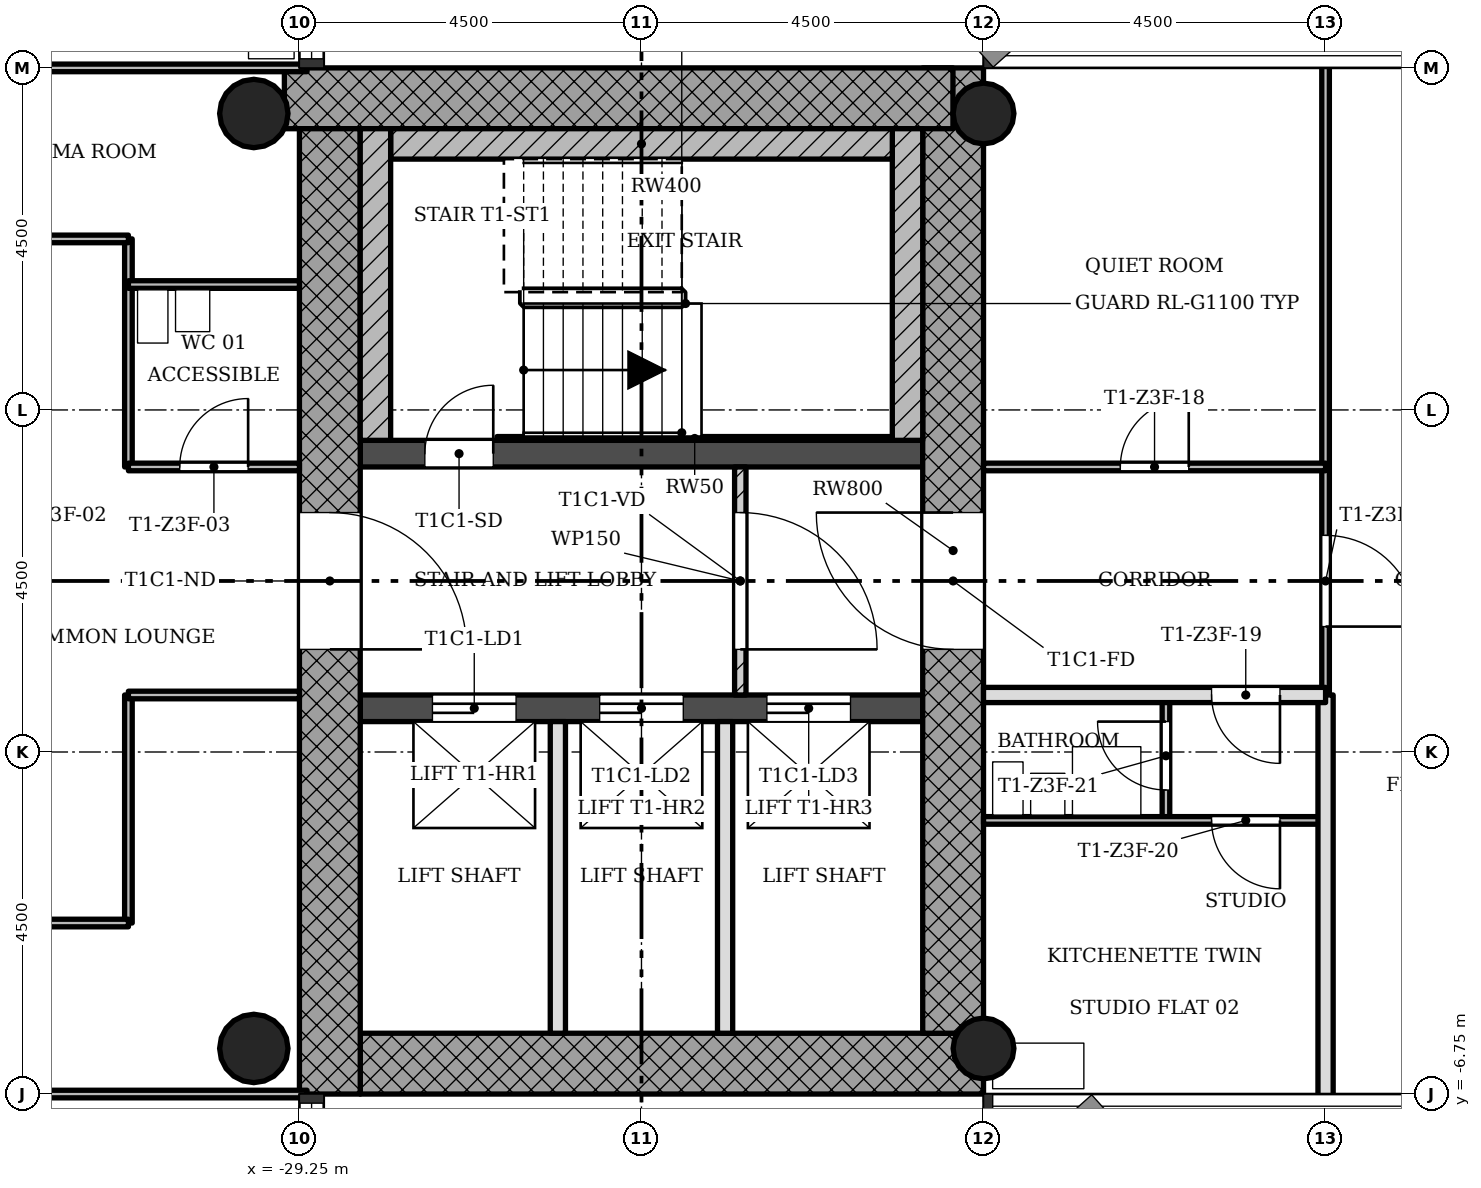
"""IFC4 building model, lengths in metres.
Left out: names, types, materials, properties, quantities, classifications, styles, units other than length and angle.
Written with IfcOpenShell. Run it as: python <this file> out.ifc"""

import sys

from ifc_helpers import new_model, si_unit, direction, frame, frame_2d, origin, origin_2d, place, context, subcontext, project, spatial, rectangle, hollow_circle, extrude, element, fill, save


model = new_model("IFC4")
c1 = context("Model", 3, precision=1e-05, world=origin(), true_north=direction((0.0, 1.0)))
c2 = subcontext(c1, "Body", "Model", "MODEL_VIEW")
j1 = project(units=[si_unit("LENGTHUNIT", "METRE"), si_unit("PLANEANGLEUNIT", "RADIAN")], contexts=[c1])
p1 = place(None, origin())
s1 = spatial("IfcSite", under=j1, at=p1, CompositionType="ELEMENT")
p2 = place(p1, origin())
s2 = spatial("IfcBuilding", under=s1, at=p2, CompositionType="ELEMENT")
p3 = place(p2, frame((0.0, 0.0, 164.3)))
s3 = spatial("IfcBuildingStorey", under=s2, at=p3, CompositionType="ELEMENT", Elevation=164.3)
p4 = place(p3, frame((-28.45, -6.35, 0.0), z_axis=(0.0, 0.0, 1.0), x_axis=(1.0, 0.0, 0.0)))
e1 = element("IfcWall", 1, at=p4, inside=s3, PredefinedType="SHEAR", context=c2, shape_type="SweptSolid", body=[
    extrude(rectangle(XDim=8.2, YDim=0.8, at=frame_2d((4.1, 0.0))), origin(), (0.0, 0.0, 1.0), 3.4),
])
p5 = place(p3, frame((-20.65, -5.95, 0.0), z_axis=(0.0, 0.0, 1.0), x_axis=(0.0, 1.0, 0.0)))
e2 = element("IfcWall", 2, at=p5, inside=s3, PredefinedType="SHEAR", context=c2, shape_type="SweptSolid", body=[
    extrude(rectangle(XDim=12.7, YDim=0.8, at=frame_2d((6.35, 0.0))), origin(), (0.0, 0.0, 1.0), 3.4),
])
p6 = place(p5, frame((5.05, 0.0, 0.0)))
e3 = element("IfcOpeningElement", 3, at=p6, cuts=e2, PredefinedType="OPENING", context=c2, shape_type="SweptSolid", body=[
    extrude(rectangle(XDim=1.8, YDim=2.1, at=frame_2d((0.9, 1.05))), frame((0.0, 0.41, 0.0), z_axis=(0.0, -1.0, 0.0), x_axis=(1.0, 0.0, 0.0)), (0.0, 0.0, 1.0), 0.82),
])
p7 = place(p3, frame((-20.652, 6.35, 0.0), z_axis=(0.0, 0.0, 1.0), x_axis=(-1.0, 0.0, 0.0)))
e4 = element("IfcWall", 4, at=p7, inside=s3, PredefinedType="SHEAR", context=c2, shape_type="SweptSolid", body=[
    extrude(rectangle(XDim=8.796, YDim=0.8, at=frame_2d((4.398, 0.0))), origin(), (0.0, 0.0, 1.0), 3.4),
])
p8 = place(p3, frame((-28.85, 5.95, 0.0), z_axis=(0.0, 0.0, 1.0), x_axis=(0.0, -1.0, 0.0)))
e5 = element("IfcWall", 5, at=p8, inside=s3, PredefinedType="SHEAR", context=c2, shape_type="SweptSolid", body=[
    extrude(rectangle(XDim=12.7, YDim=0.8, at=frame_2d((6.35, 0.0))), origin(), (0.0, 0.0, 1.0), 3.4),
])
p9 = place(p8, frame((5.05, 0.0, 0.0)))
e6 = element("IfcOpeningElement", 6, at=p9, cuts=e5, PredefinedType="OPENING", context=c2, shape_type="SweptSolid", body=[
    extrude(rectangle(XDim=1.8, YDim=2.1, at=frame_2d((0.9, 1.05))), frame((0.0, 0.41, 0.0), z_axis=(0.0, -1.0, 0.0), x_axis=(1.0, 0.0, 0.0)), (0.0, 0.0, 1.0), 0.82),
])
p10 = place(p3, frame((-28.45, -1.675, 0.0), z_axis=(0.0, 0.0, 1.0), x_axis=(1.0, 0.0, 0.0)))
e7 = element("IfcWall", 7, at=p10, inside=s3, PredefinedType="SHEAR", context=c2, shape_type="SweptSolid", body=[
    extrude(rectangle(XDim=7.4, YDim=0.35, at=frame_2d((3.7, 0.0))), origin(), (0.0, 0.0, 1.0), 3.4),
])
p11 = place(p10, frame((0.95, 0.0, 0.0)))
e8 = element("IfcOpeningElement", 8, at=p11, cuts=e7, PredefinedType="OPENING", context=c2, shape_type="SweptSolid", body=[
    extrude(rectangle(XDim=1.1, YDim=2.1, at=frame_2d((0.55, 1.05))), frame((0.0, 0.185, 0.0), z_axis=(0.0, -1.0, 0.0), x_axis=(1.0, 0.0, 0.0)), (0.0, 0.0, 1.0), 0.37),
])
p12 = place(p10, frame((3.15, 0.0, 0.0)))
e9 = element("IfcOpeningElement", 9, at=p12, cuts=e7, PredefinedType="OPENING", context=c2, shape_type="SweptSolid", body=[
    extrude(rectangle(XDim=1.1, YDim=2.1, at=frame_2d((0.55, 1.05))), frame((0.0, 0.185, 0.0), z_axis=(0.0, -1.0, 0.0), x_axis=(1.0, 0.0, 0.0)), (0.0, 0.0, 1.0), 0.37),
])
p13 = place(p10, frame((5.35, 0.0, 0.0)))
e10 = element("IfcOpeningElement", 10, at=p13, cuts=e7, PredefinedType="OPENING", context=c2, shape_type="SweptSolid", body=[
    extrude(rectangle(XDim=1.1, YDim=2.1, at=frame_2d((0.55, 1.05))), frame((0.0, 0.185, 0.0), z_axis=(0.0, -1.0, 0.0), x_axis=(1.0, 0.0, 0.0)), (0.0, 0.0, 1.0), 0.37),
])
p14 = place(p3, frame((-28.45, 1.675, 0.0), z_axis=(0.0, 0.0, 1.0), x_axis=(1.0, 0.0, 0.0)))
e11 = element("IfcWall", 11, at=p14, inside=s3, PredefinedType="SHEAR", context=c2, shape_type="SweptSolid", body=[
    extrude(rectangle(XDim=7.4, YDim=0.35, at=frame_2d((3.7, 0.0))), origin(), (0.0, 0.0, 1.0), 3.4),
])
p15 = place(p14, frame((0.85, 0.0, 0.0)))
e12 = element("IfcOpeningElement", 12, at=p15, cuts=e11, PredefinedType="OPENING", context=c2, shape_type="SweptSolid", body=[
    extrude(rectangle(XDim=0.9, YDim=2.1, at=frame_2d((0.45, 1.05))), frame((0.0, 0.185, 0.0), z_axis=(0.0, -1.0, 0.0), x_axis=(1.0, 0.0, 0.0)), (0.0, 0.0, 1.0), 0.37),
])
for number, where, z_axis, x_axis in (
    (13, (-20.25, -6.15, 0.0), (0.0, 0.0, 1.0), (1.0, 0.0, 0.0)),
    (14, (-20.25, 6.15, 0.0), (0.0, 0.0, 1.0), (1.0, 0.0, 0.0)),
):
    element("IfcColumn", number, at=place(p3, frame(where, z_axis=z_axis, x_axis=x_axis)), inside=s3, PredefinedType="COLUMN", context=c2, shape_type="SweptSolid", body=[
        extrude(hollow_circle(Radius=0.4, WallThickness=0.028, at=origin_2d()), origin(), (0.0, 0.0, 1.0), 3.4),
    ])
for number, where, z_axis, x_axis in (
    (15, (-29.85, -6.15, 0.0), (0.0, 0.0, 1.0), (1.0, 0.0, 0.0)),
    (16, (-29.85, 6.15, 0.0), (0.0, 0.0, 1.0), (1.0, 0.0, 0.0)),
):
    element("IfcColumn", number, at=place(p3, frame(where, z_axis=z_axis, x_axis=x_axis)), inside=s3, PredefinedType="COLUMN", context=c2, shape_type="SweptSolid", body=[
        extrude(hollow_circle(Radius=0.45, WallThickness=0.032, at=origin_2d()), origin(), (0.0, 0.0, 1.0), 3.4),
    ])
p16 = place(p3, frame((-23.45, -1.5, 0.0), z_axis=(0.0, 0.0, 1.0), x_axis=(0.0, 1.0, 0.0)))
e17 = element("IfcWall", 17, at=p16, inside=s3, PredefinedType="PARTITIONING", context=c2, shape_type="SweptSolid", body=[
    extrude(rectangle(XDim=3.0, YDim=0.15, at=frame_2d((1.5, 0.0))), origin(), (0.0, 0.0, 1.0), 3.0),
])
p17 = place(p16, frame((0.6, 0.0, 0.0)))
e18 = element("IfcOpeningElement", 18, at=p17, cuts=e17, PredefinedType="OPENING", context=c2, shape_type="SweptSolid", body=[
    extrude(rectangle(XDim=1.8, YDim=2.1, at=frame_2d((0.9, 1.05))), frame((0.0, 0.085, 0.0), z_axis=(0.0, -1.0, 0.0), x_axis=(1.0, 0.0, 0.0)), (0.0, 0.0, 1.0), 0.17),
])
for number, where, z_axis, x_axis in (
    (19, (-25.85, -5.95, 0.0), (0.0, 0.0, 1.0), (0.0, 1.0, 0.0)),
    (20, (-23.65, -5.95, 0.0), (0.0, 0.0, 1.0), (0.0, 1.0, 0.0)),
):
    element("IfcWall", number, at=place(p3, frame(where, z_axis=z_axis, x_axis=x_axis)), inside=s3, PredefinedType="SOLIDWALL", context=c2, shape_type="SweptSolid", body=[
        extrude(rectangle(XDim=4.1, YDim=0.2, at=frame_2d((2.05, 0.0))), origin(), (0.0, 0.0, 1.0), 3.0),
    ])
for number, where, z_axis, x_axis in (
    (21, (-31.5, -4.5, 0.0), (0.0, 0.0, 1.0), (0.0, 1.0, 0.0)),
    (22, (-31.5, 1.5, 0.0), (0.0, 0.0, 1.0), (0.0, 1.0, 0.0)),
):
    element("IfcWall", number, at=place(p3, frame(where, z_axis=z_axis, x_axis=x_axis)), inside=s3, PredefinedType="PARTITIONING", context=c2, shape_type="SweptSolid", body=[
        extrude(rectangle(XDim=3.0, YDim=0.1, at=frame_2d((1.5, 0.0))), origin(), (0.0, 0.0, 1.0), 3.0),
    ])
p18 = place(p3, frame((-17.85, -3.15, 0.0), z_axis=(0.0, 0.0, 1.0), x_axis=(0.0, 1.0, 0.0)))
e23 = element("IfcWall", 23, at=p18, inside=s3, PredefinedType="PARTITIONING", context=c2, shape_type="SweptSolid", body=[
    extrude(rectangle(XDim=1.65, YDim=0.1, at=frame_2d((0.825, 0.0))), origin(), (0.0, 0.0, 1.0), 3.0),
])
p19 = place(p18, frame((0.4, 0.0, 0.0)))
e24 = element("IfcOpeningElement", 24, at=p19, cuts=e23, PredefinedType="OPENING", context=c2, shape_type="SweptSolid", body=[
    extrude(rectangle(XDim=0.9, YDim=2.1, at=frame_2d((0.45, 1.05))), frame((0.0, 0.06, 0.0), z_axis=(0.0, -1.0, 0.0), x_axis=(1.0, 0.0, 0.0)), (0.0, 0.0, 1.0), 0.12),
])
p20 = place(p3, frame((-15.75, -1.5, 0.0), z_axis=(0.0, 0.0, 1.0), x_axis=(0.0, 1.0, 0.0)))
e25 = element("IfcWall", 25, at=p20, inside=s3, PredefinedType="PARTITIONING", context=c2, shape_type="SweptSolid", body=[
    extrude(rectangle(XDim=8.35, YDim=0.1, at=frame_2d((4.175, 0.0))), origin(), (0.0, 0.0, 1.0), 3.0),
])
p21 = place(p20, frame((0.9, 0.0, 0.0)))
e26 = element("IfcOpeningElement", 26, at=p21, cuts=e25, PredefinedType="OPENING", context=c2, shape_type="SweptSolid", body=[
    extrude(rectangle(XDim=1.2, YDim=2.1, at=frame_2d((0.6, 1.05))), frame((0.0, 0.06, 0.0), z_axis=(0.0, -1.0, 0.0), x_axis=(1.0, 0.0, 0.0)), (0.0, 0.0, 1.0), 0.12),
])
p22 = place(p3, frame((-15.75, -6.85, 0.0), z_axis=(0.0, 0.0, 1.0), x_axis=(0.0, 1.0, 0.0)))
e27 = element("IfcWall", 27, at=p22, inside=s3, PredefinedType="SOLIDWALL", context=c2, shape_type="SweptSolid", body=[
    extrude(rectangle(XDim=5.35, YDim=0.2, at=frame_2d((2.675, 0.0))), origin(), (0.0, 0.0, 1.0), 3.0),
])
p23 = place(p3, frame((-35.1, -6.75, 0.0), z_axis=(0.0, 0.0, 1.0), x_axis=(1.0, 0.0, 0.0)))
e28 = element("IfcWall", 28, at=p23, inside=s3, PredefinedType="PARTITIONING", context=c2, shape_type="SweptSolid", body=[
    extrude(rectangle(XDim=5.95, YDim=0.1, at=frame_2d((2.975, 0.0))), origin(), (0.0, 0.0, 1.0), 3.0),
])
p24 = place(p3, frame((-35.1, -4.5, 0.0), z_axis=(0.0, 0.0, 1.0), x_axis=(1.0, 0.0, 0.0)))
e29 = element("IfcWall", 29, at=p24, inside=s3, PredefinedType="PARTITIONING", context=c2, shape_type="SweptSolid", body=[
    extrude(rectangle(XDim=3.6, YDim=0.1, at=frame_2d((1.8, 0.0))), origin(), (0.0, 0.0, 1.0), 3.0),
])
p25 = place(p24, frame((1.35, 0.0, 0.0)))
e30 = element("IfcOpeningElement", 30, at=p25, cuts=e29, PredefinedType="OPENING", context=c2, shape_type="SweptSolid", body=[
    extrude(rectangle(XDim=0.9, YDim=2.1, at=frame_2d((0.45, 1.05))), frame((0.0, 0.06, 0.0), z_axis=(0.0, -1.0, 0.0), x_axis=(1.0, 0.0, 0.0)), (0.0, 0.0, 1.0), 0.12),
])
p26 = place(p3, frame((-20.25, -3.15, 0.0), z_axis=(0.0, 0.0, 1.0), x_axis=(1.0, 0.0, 0.0)))
e31 = element("IfcWall", 31, at=p26, inside=s3, PredefinedType="PARTITIONING", context=c2, shape_type="SweptSolid", body=[
    extrude(rectangle(XDim=4.5, YDim=0.1, at=frame_2d((2.25, 0.0))), origin(), (0.0, 0.0, 1.0), 3.0),
])
p27 = place(p26, frame((3.0, 0.0, 0.0)))
e32 = element("IfcOpeningElement", 32, at=p27, cuts=e31, PredefinedType="OPENING", context=c2, shape_type="SweptSolid", body=[
    extrude(rectangle(XDim=0.9, YDim=2.1, at=frame_2d((0.45, 1.05))), frame((0.0, 0.06, 0.0), z_axis=(0.0, -1.0, 0.0), x_axis=(1.0, 0.0, 0.0)), (0.0, 0.0, 1.0), 0.12),
])
p28 = place(p3, frame((-31.5, -1.5, 0.0), z_axis=(0.0, 0.0, 1.0), x_axis=(1.0, 0.0, 0.0)))
e33 = element("IfcWall", 33, at=p28, inside=s3, PredefinedType="PARTITIONING", context=c2, shape_type="SweptSolid", body=[
    extrude(rectangle(XDim=2.25, YDim=0.1, at=frame_2d((1.125, 0.0))), origin(), (0.0, 0.0, 1.0), 3.0),
])
p29 = place(p3, frame((-20.25, -1.5, 0.0), z_axis=(0.0, 0.0, 1.0), x_axis=(1.0, 0.0, 0.0)))
e34 = element("IfcWall", 34, at=p29, inside=s3, PredefinedType="SOLIDWALL", context=c2, shape_type="SweptSolid", body=[
    extrude(rectangle(XDim=4.5, YDim=0.2, at=frame_2d((2.25, 0.0))), origin(), (0.0, 0.0, 1.0), 3.0),
])
p30 = place(p29, frame((3.0, 0.0, 0.0)))
e35 = element("IfcOpeningElement", 35, at=p30, cuts=e34, PredefinedType="OPENING", context=c2, shape_type="SweptSolid", body=[
    extrude(rectangle(XDim=0.9, YDim=2.1, at=frame_2d((0.45, 1.05))), frame((0.0, 0.11, 0.0), z_axis=(0.0, -1.0, 0.0), x_axis=(1.0, 0.0, 0.0)), (0.0, 0.0, 1.0), 0.22),
])
p31 = place(p3, frame((-31.5, 1.5, 0.0), z_axis=(0.0, 0.0, 1.0), x_axis=(1.0, 0.0, 0.0)))
e36 = element("IfcWall", 36, at=p31, inside=s3, PredefinedType="PARTITIONING", context=c2, shape_type="SweptSolid", body=[
    extrude(rectangle(XDim=2.25, YDim=0.1, at=frame_2d((1.125, 0.0))), origin(), (0.0, 0.0, 1.0), 3.0),
])
p32 = place(p31, frame((0.675, 0.0, 0.0)))
e37 = element("IfcOpeningElement", 37, at=p32, cuts=e36, PredefinedType="OPENING", context=c2, shape_type="SweptSolid", body=[
    extrude(rectangle(XDim=0.9, YDim=2.1, at=frame_2d((0.45, 1.05))), frame((0.0, 0.06, 0.0), z_axis=(0.0, -1.0, 0.0), x_axis=(1.0, 0.0, 0.0)), (0.0, 0.0, 1.0), 0.12),
])
p33 = place(p3, frame((-20.25, 1.5, 0.0), z_axis=(0.0, 0.0, 1.0), x_axis=(1.0, 0.0, 0.0)))
e38 = element("IfcWall", 38, at=p33, inside=s3, PredefinedType="PARTITIONING", context=c2, shape_type="SweptSolid", body=[
    extrude(rectangle(XDim=4.5, YDim=0.1, at=frame_2d((2.25, 0.0))), origin(), (0.0, 0.0, 1.0), 3.0),
])
p34 = place(p33, frame((1.8, 0.0, 0.0)))
e39 = element("IfcOpeningElement", 39, at=p34, cuts=e38, PredefinedType="OPENING", context=c2, shape_type="SweptSolid", body=[
    extrude(rectangle(XDim=0.9, YDim=2.1, at=frame_2d((0.45, 1.05))), frame((0.0, 0.06, 0.0), z_axis=(0.0, -1.0, 0.0), x_axis=(1.0, 0.0, 0.0)), (0.0, 0.0, 1.0), 0.12),
])
p35 = place(p3, frame((-31.5, 3.9, 0.0), z_axis=(0.0, 0.0, 1.0), x_axis=(1.0, 0.0, 0.0)))
e40 = element("IfcWall", 40, at=p35, inside=s3, PredefinedType="PARTITIONING", context=c2, shape_type="SweptSolid", body=[
    extrude(rectangle(XDim=2.25, YDim=0.1, at=frame_2d((1.125, 0.0))), origin(), (0.0, 0.0, 1.0), 3.0),
])
p36 = place(p3, frame((-35.1, 4.5, 0.0), z_axis=(0.0, 0.0, 1.0), x_axis=(1.0, 0.0, 0.0)))
e41 = element("IfcWall", 41, at=p36, inside=s3, PredefinedType="PARTITIONING", context=c2, shape_type="SweptSolid", body=[
    extrude(rectangle(XDim=3.6, YDim=0.1, at=frame_2d((1.8, 0.0))), origin(), (0.0, 0.0, 1.0), 3.0),
])
p37 = place(p36, frame((1.35, 0.0, 0.0)))
e42 = element("IfcOpeningElement", 42, at=p37, cuts=e41, PredefinedType="OPENING", context=c2, shape_type="SweptSolid", body=[
    extrude(rectangle(XDim=0.9, YDim=2.1, at=frame_2d((0.45, 1.05))), frame((0.0, 0.06, 0.0), z_axis=(0.0, -1.0, 0.0), x_axis=(1.0, 0.0, 0.0)), (0.0, 0.0, 1.0), 0.12),
])
p38 = place(p3, frame((-35.1, 6.75, 0.0), z_axis=(0.0, 0.0, 1.0), x_axis=(1.0, 0.0, 0.0)))
e43 = element("IfcWall", 43, at=p38, inside=s3, PredefinedType="PARTITIONING", context=c2, shape_type="SweptSolid", body=[
    extrude(rectangle(XDim=5.95, YDim=0.1, at=frame_2d((2.975, 0.0))), origin(), (0.0, 0.0, 1.0), 3.0),
])
p39 = place(p3, frame((-21.25, 1.85, 0.0), z_axis=(0.0, 0.0, 1.0), x_axis=(0.0, 1.0, 0.0)))
e44 = element("IfcWall", 44, at=p39, inside=s3, PredefinedType="SHEAR", context=c2, shape_type="SweptSolid", body=[
    extrude(rectangle(XDim=4.1, YDim=0.4, at=frame_2d((2.05, 0.0))), origin(), (0.0, 0.0, 1.0), 3.4),
])
p40 = place(p3, frame((-28.05, 5.75, 0.0), z_axis=(0.0, 0.0, 1.0), x_axis=(1.0, 0.0, 0.0)))
e45 = element("IfcWall", 45, at=p40, inside=s3, PredefinedType="SHEAR", context=c2, shape_type="SweptSolid", body=[
    extrude(rectangle(XDim=6.6, YDim=0.4, at=frame_2d((3.3, 0.0))), origin(), (0.0, 0.0, 1.0), 3.4),
])
p41 = place(p3, frame((-28.25, 1.85, 0.0), z_axis=(0.0, 0.0, 1.0), x_axis=(0.0, 1.0, 0.0)))
e46 = element("IfcWall", 46, at=p41, inside=s3, PredefinedType="SHEAR", context=c2, shape_type="SweptSolid", body=[
    extrude(rectangle(XDim=4.1, YDim=0.4, at=frame_2d((2.05, 0.0))), origin(), (0.0, 0.0, 1.0), 3.4),
])
p42 = place(p3, frame((-26.65, 1.875, 0.0), z_axis=(0.0, 0.0, 1.0), x_axis=(1.0, 0.0, 0.0)))
e47 = element("IfcWall", 47, at=p42, inside=s3, PredefinedType="SHEAR", context=c2, shape_type="SweptSolid", body=[
    extrude(rectangle(XDim=5.2, YDim=0.05, at=frame_2d((2.6, 0.0))), origin(), (0.0, 0.0, 1.0), 3.4),
])
p43 = place(p17, origin())
e48 = element("IfcDoor", 48, at=p43, inside=s3, OperationType="SINGLE_SWING_LEFT", PredefinedType="DOOR", context=c2, shape_type="SweptSolid", body=[
    extrude(rectangle(XDim=1.8, YDim=2.1, at=frame_2d((0.9, 1.05))), frame((0.0, 0.025, 0.0), z_axis=(0.0, -1.0, 0.0), x_axis=(1.0, 0.0, 0.0)), (0.0, 0.0, 1.0), 0.05),
])
fill(e18, e48)
p44 = place(p32, origin())
e49 = element("IfcDoor", 49, at=p44, inside=s3, OperationType="SINGLE_SWING_LEFT", PredefinedType="DOOR", context=c2, shape_type="SweptSolid", body=[
    extrude(rectangle(XDim=0.9, YDim=2.1, at=frame_2d((0.45, 1.05))), frame((0.0, 0.025, 0.0), z_axis=(0.0, -1.0, 0.0), x_axis=(1.0, 0.0, 0.0)), (0.0, 0.0, 1.0), 0.05),
])
fill(e37, e49)
p45 = place(p34, origin())
e50 = element("IfcDoor", 50, at=p45, inside=s3, OperationType="SINGLE_SWING_LEFT", PredefinedType="DOOR", context=c2, shape_type="SweptSolid", body=[
    extrude(rectangle(XDim=0.9, YDim=2.1, at=frame_2d((0.45, 1.05))), frame((0.0, 0.025, 0.0), z_axis=(0.0, -1.0, 0.0), x_axis=(1.0, 0.0, 0.0)), (0.0, 0.0, 1.0), 0.05),
])
fill(e39, e50)
p46 = place(p30, origin())
e51 = element("IfcDoor", 51, at=p46, inside=s3, OperationType="SINGLE_SWING_RIGHT", PredefinedType="DOOR", context=c2, shape_type="SweptSolid", body=[
    extrude(rectangle(XDim=0.9, YDim=2.1, at=frame_2d((0.45, 1.05))), frame((0.0, 0.025, 0.0), z_axis=(0.0, -1.0, 0.0), x_axis=(1.0, 0.0, 0.0)), (0.0, 0.0, 1.0), 0.05),
])
fill(e35, e51)
p47 = place(p27, origin())
e52 = element("IfcDoor", 52, at=p47, inside=s3, OperationType="SINGLE_SWING_RIGHT", PredefinedType="DOOR", context=c2, shape_type="SweptSolid", body=[
    extrude(rectangle(XDim=0.9, YDim=2.1, at=frame_2d((0.45, 1.05))), frame((0.0, 0.025, 0.0), z_axis=(0.0, -1.0, 0.0), x_axis=(1.0, 0.0, 0.0)), (0.0, 0.0, 1.0), 0.05),
])
fill(e32, e52)
p48 = place(p19, origin())
e53 = element("IfcDoor", 53, at=p48, inside=s3, OperationType="SINGLE_SWING_LEFT", PredefinedType="DOOR", context=c2, shape_type="SweptSolid", body=[
    extrude(rectangle(XDim=0.9, YDim=2.1, at=frame_2d((0.45, 1.05))), frame((0.0, 0.025, 0.0), z_axis=(0.0, -1.0, 0.0), x_axis=(1.0, 0.0, 0.0)), (0.0, 0.0, 1.0), 0.05),
])
fill(e24, e53)
p49 = place(p21, origin())
e54 = element("IfcDoor", 54, at=p49, inside=s3, OperationType="SINGLE_SWING_LEFT", PredefinedType="DOOR", context=c2, shape_type="SweptSolid", body=[
    extrude(rectangle(XDim=1.2, YDim=2.1, at=frame_2d((0.6, 1.05))), frame((0.0, 0.025, 0.0), z_axis=(0.0, -1.0, 0.0), x_axis=(1.0, 0.0, 0.0)), (0.0, 0.0, 1.0), 0.05),
])
fill(e26, e54)
p50 = place(p15, origin())
e55 = element("IfcDoor", 55, at=p50, inside=s3, OperationType="SINGLE_SWING_LEFT", PredefinedType="DOOR", context=c2, shape_type="SweptSolid", body=[
    extrude(rectangle(XDim=0.9, YDim=2.1, at=frame_2d((0.45, 1.05))), frame((0.0, 0.025, 0.0), z_axis=(0.0, -1.0, 0.0), x_axis=(1.0, 0.0, 0.0)), (0.0, 0.0, 1.0), 0.05),
])
fill(e12, e55)
p51 = place(p11, origin())
e56 = element("IfcDoor", 56, at=p51, inside=s3, OperationType="SLIDING_TO_LEFT", PredefinedType="DOOR", context=c2, shape_type="SweptSolid", body=[
    extrude(rectangle(XDim=1.1, YDim=2.1, at=frame_2d((0.55, 1.05))), frame((0.0, 0.025, 0.0), z_axis=(0.0, -1.0, 0.0), x_axis=(1.0, 0.0, 0.0)), (0.0, 0.0, 1.0), 0.05),
])
fill(e8, e56)
p52 = place(p12, origin())
e57 = element("IfcDoor", 57, at=p52, inside=s3, OperationType="SLIDING_TO_LEFT", PredefinedType="DOOR", context=c2, shape_type="SweptSolid", body=[
    extrude(rectangle(XDim=1.1, YDim=2.1, at=frame_2d((0.55, 1.05))), frame((0.0, 0.025, 0.0), z_axis=(0.0, -1.0, 0.0), x_axis=(1.0, 0.0, 0.0)), (0.0, 0.0, 1.0), 0.05),
])
fill(e9, e57)
p53 = place(p13, origin())
e58 = element("IfcDoor", 58, at=p53, inside=s3, OperationType="SLIDING_TO_LEFT", PredefinedType="DOOR", context=c2, shape_type="SweptSolid", body=[
    extrude(rectangle(XDim=1.1, YDim=2.1, at=frame_2d((0.55, 1.05))), frame((0.0, 0.025, 0.0), z_axis=(0.0, -1.0, 0.0), x_axis=(1.0, 0.0, 0.0)), (0.0, 0.0, 1.0), 0.05),
])
fill(e10, e58)
p54 = place(p9, origin())
e59 = element("IfcDoor", 59, at=p54, inside=s3, OperationType="SINGLE_SWING_LEFT", PredefinedType="DOOR", context=c2, shape_type="SweptSolid", body=[
    extrude(rectangle(XDim=1.8, YDim=2.1, at=frame_2d((0.9, 1.05))), frame((0.0, 0.025, 0.0), z_axis=(0.0, -1.0, 0.0), x_axis=(1.0, 0.0, 0.0)), (0.0, 0.0, 1.0), 0.05),
])
fill(e6, e59)
p55 = place(p6, origin())
e60 = element("IfcDoor", 60, at=p55, inside=s3, OperationType="SINGLE_SWING_LEFT", PredefinedType="DOOR", context=c2, shape_type="SweptSolid", body=[
    extrude(rectangle(XDim=1.8, YDim=2.1, at=frame_2d((0.9, 1.05))), frame((0.0, 0.025, 0.0), z_axis=(0.0, -1.0, 0.0), x_axis=(1.0, 0.0, 0.0)), (0.0, 0.0, 1.0), 0.05),
])
fill(e3, e60)
save(model, sys.argv[1])
